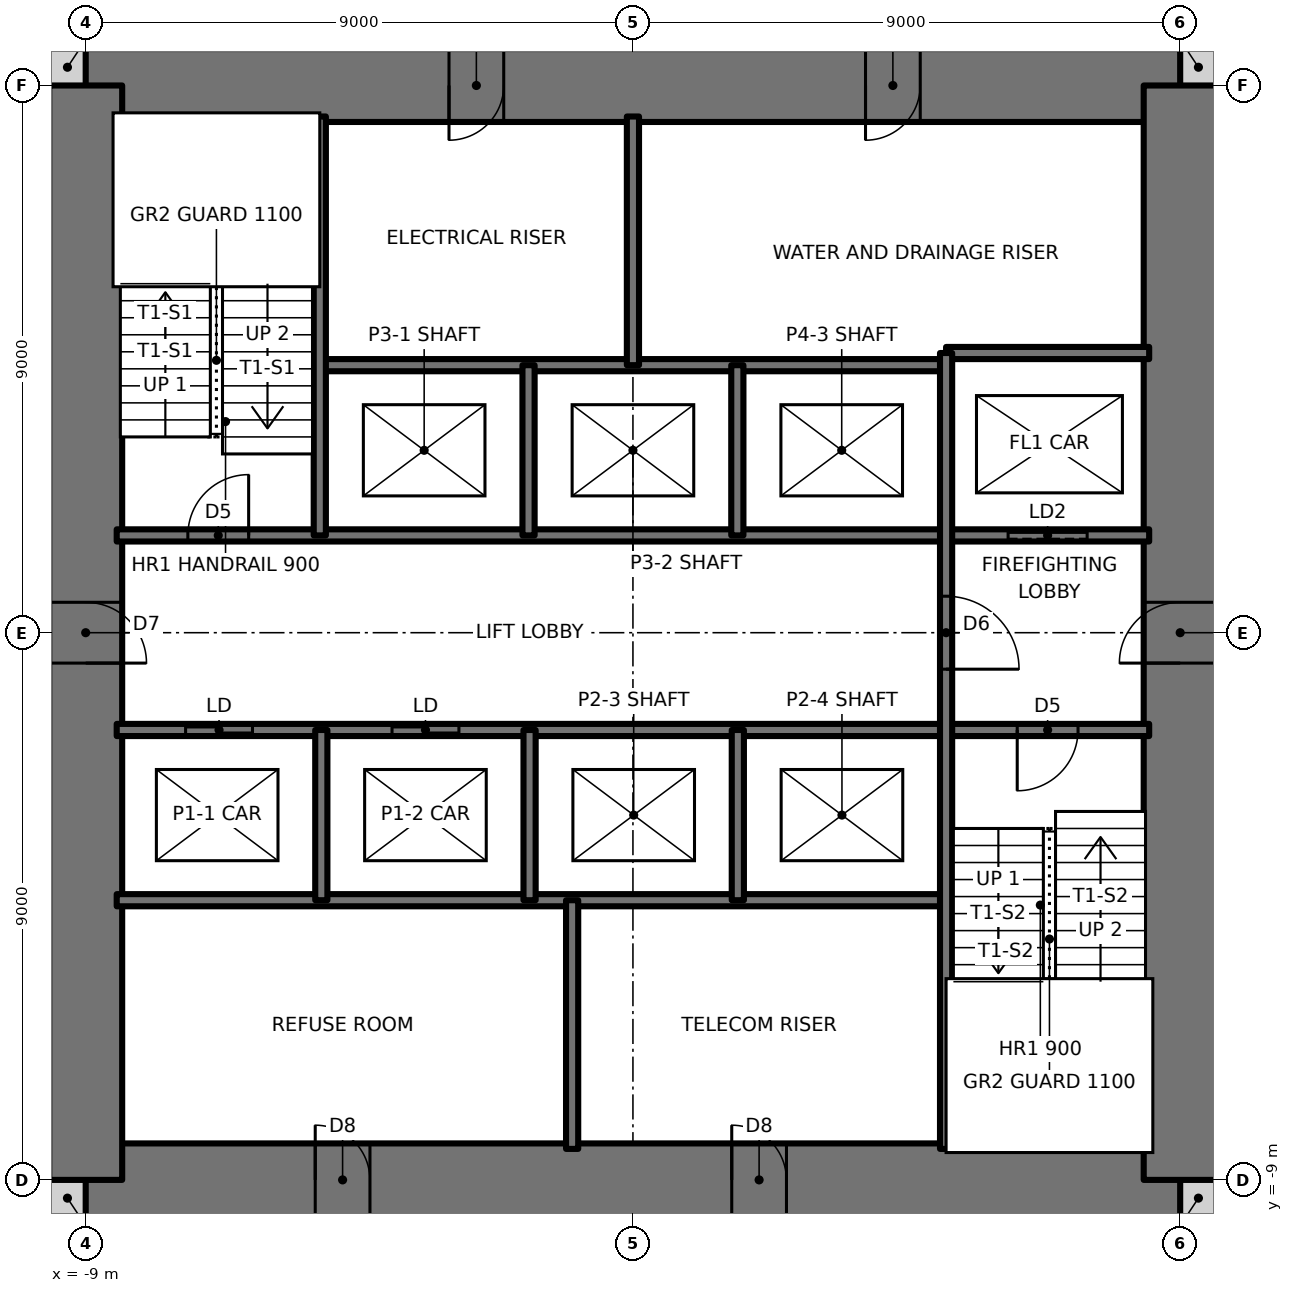
"""IFC4 building model, lengths in metres.
Left out: names, types, materials, properties, quantities, classifications, styles, units other than length and angle.
Written with IfcOpenShell. Run it as: python <this file> out.ifc"""

import sys

from ifc_helpers import new_model, si_unit, direction, frame, frame_2d, origin, place, context, subcontext, project, spatial, rectangle, extrude, element, fill, save


model = new_model("IFC4")
c1 = context("Model", 3, precision=1e-05, world=origin(), true_north=direction((0.0, 1.0)))
c2 = subcontext(c1, "Body", "Model", "MODEL_VIEW")
j1 = project(units=[si_unit("LENGTHUNIT", "METRE"), si_unit("PLANEANGLEUNIT", "RADIAN")], contexts=[c1])
p1 = place(None, origin())
s1 = spatial("IfcSite", under=j1, at=p1, CompositionType="ELEMENT")
p2 = place(p1, origin())
s2 = spatial("IfcBuilding", under=s1, at=p2, CompositionType="ELEMENT")
p3 = place(p2, frame((0.0, 0.0, 50.0)))
s3 = spatial("IfcBuildingStorey", under=s2, at=p3, CompositionType="ELEMENT", Elevation=50.0)
for number, where, z_axis, x_axis in (
    (1, (-9.6, -9.3, 0.0), (0.0, 0.0, 1.0), (1.0, 0.0, 0.0)),
    (2, (9.0, -9.3, 0.0), (0.0, 0.0, 1.0), (1.0, 0.0, 0.0)),
    (3, (9.0, 9.3, 0.0), (0.0, 0.0, 1.0), (1.0, 0.0, 0.0)),
    (4, (-9.6, 9.3, 0.0), (0.0, 0.0, 1.0), (1.0, 0.0, 0.0)),
):
    element("IfcWall", number, at=place(p3, frame(where, z_axis=z_axis, x_axis=x_axis)), inside=s3, PredefinedType="SOLIDWALL", context=c2, shape_type="SweptSolid", body=[
        extrude(rectangle(XDim=0.6, YDim=0.6, at=frame_2d((0.3, 0.0))), origin(), (0.0, 0.0, 1.0), 3.5),
    ])
p4 = place(p3, frame((-9.0, -9.0, 0.0), z_axis=(0.0, 0.0, 1.0), x_axis=(1.0, 0.0, 0.0)))
e5 = element("IfcWall", 5, at=p4, inside=s3, PredefinedType="SHEAR", context=c2, shape_type="SweptSolid", body=[
    extrude(rectangle(XDim=18.0, YDim=1.2, at=frame_2d((9.0, 0.0))), origin(), (0.0, 0.0, 1.0), 3.5),
])
p5 = place(p4, frame((3.775, 0.0, 0.0)))
e6 = element("IfcOpeningElement", 6, at=p5, cuts=e5, PredefinedType="OPENING", context=c2, shape_type="SweptSolid", body=[
    extrude(rectangle(XDim=0.9, YDim=2.1, at=frame_2d((0.45, 1.05))), frame((0.0, 0.61, 0.0), z_axis=(0.0, -1.0, 0.0), x_axis=(1.0, 0.0, 0.0)), (0.0, 0.0, 1.0), 1.22),
])
p6 = place(p4, frame((10.625, 0.0, 0.0)))
e7 = element("IfcOpeningElement", 7, at=p6, cuts=e5, PredefinedType="OPENING", context=c2, shape_type="SweptSolid", body=[
    extrude(rectangle(XDim=0.9, YDim=2.1, at=frame_2d((0.45, 1.05))), frame((0.0, 0.61, 0.0), z_axis=(0.0, -1.0, 0.0), x_axis=(1.0, 0.0, 0.0)), (0.0, 0.0, 1.0), 1.22),
])
p7 = place(p3, frame((9.0, 9.0, 0.0), z_axis=(0.0, 0.0, 1.0), x_axis=(-1.0, 0.0, 0.0)))
e8 = element("IfcWall", 8, at=p7, inside=s3, PredefinedType="SHEAR", context=c2, shape_type="SweptSolid", body=[
    extrude(rectangle(XDim=18.0, YDim=1.2, at=frame_2d((9.0, 0.0))), origin(), (0.0, 0.0, 1.0), 3.5),
])
p8 = place(p7, frame((11.125, 0.0, 0.0)))
e9 = element("IfcOpeningElement", 9, at=p8, cuts=e8, PredefinedType="OPENING", context=c2, shape_type="SweptSolid", body=[
    extrude(rectangle(XDim=0.9, YDim=2.1, at=frame_2d((0.45, 1.05))), frame((0.0, 0.61, 0.0), z_axis=(0.0, -1.0, 0.0), x_axis=(1.0, 0.0, 0.0)), (0.0, 0.0, 1.0), 1.22),
])
p9 = place(p7, frame((4.275, 0.0, 0.0)))
e10 = element("IfcOpeningElement", 10, at=p9, cuts=e8, PredefinedType="OPENING", context=c2, shape_type="SweptSolid", body=[
    extrude(rectangle(XDim=0.9, YDim=2.1, at=frame_2d((0.45, 1.05))), frame((0.0, 0.61, 0.0), z_axis=(0.0, -1.0, 0.0), x_axis=(1.0, 0.0, 0.0)), (0.0, 0.0, 1.0), 1.22),
])
p10 = place(p3, frame((9.0, -9.0, 0.0), z_axis=(0.0, 0.0, 1.0), x_axis=(0.0, 1.0, 0.0)))
e11 = element("IfcWall", 11, at=p10, inside=s3, PredefinedType="SHEAR", context=c2, shape_type="SweptSolid", body=[
    extrude(rectangle(XDim=18.0, YDim=1.2, at=frame_2d((9.0, 0.0))), origin(), (0.0, 0.0, 1.0), 3.5),
])
p11 = place(p10, frame((8.5, 0.0, 0.0)))
e12 = element("IfcOpeningElement", 12, at=p11, cuts=e11, PredefinedType="OPENING", context=c2, shape_type="SweptSolid", body=[
    extrude(rectangle(XDim=1.0, YDim=2.1, at=frame_2d((0.5, 1.05))), frame((0.0, 0.61, 0.0), z_axis=(0.0, -1.0, 0.0), x_axis=(1.0, 0.0, 0.0)), (0.0, 0.0, 1.0), 1.22),
])
p12 = place(p3, frame((-9.0, 9.0, 0.0), z_axis=(0.0, 0.0, 1.0), x_axis=(0.0, -1.0, 0.0)))
e13 = element("IfcWall", 13, at=p12, inside=s3, PredefinedType="SHEAR", context=c2, shape_type="SweptSolid", body=[
    extrude(rectangle(XDim=18.0, YDim=1.2, at=frame_2d((9.0, 0.0))), origin(), (0.0, 0.0, 1.0), 3.5),
])
p13 = place(p12, frame((8.5, 0.0, 0.0)))
e14 = element("IfcOpeningElement", 14, at=p13, cuts=e13, PredefinedType="OPENING", context=c2, shape_type="SweptSolid", body=[
    extrude(rectangle(XDim=1.0, YDim=2.1, at=frame_2d((0.5, 1.05))), frame((0.0, 0.61, 0.0), z_axis=(0.0, -1.0, 0.0), x_axis=(1.0, 0.0, 0.0)), (0.0, 0.0, 1.0), 1.22),
])
p14 = place(p3, frame((-8.49, -4.4, 0.0), z_axis=(0.0, 0.0, 1.0), x_axis=(1.0, 0.0, 0.0)))
e15 = element("IfcWall", 15, at=p14, inside=s3, PredefinedType="SOLIDWALL", context=c2, shape_type="SweptSolid", body=[
    extrude(rectangle(XDim=13.64, YDim=0.2, at=frame_2d((6.82, 0.0))), origin(), (0.0, 0.0, 1.0), 3.5),
])
p15 = place(p3, frame((-8.49, -1.6, 0.0), z_axis=(0.0, 0.0, 1.0), x_axis=(1.0, 0.0, 0.0)))
e16 = element("IfcWall", 16, at=p15, inside=s3, PredefinedType="SOLIDWALL", context=c2, shape_type="SweptSolid", body=[
    extrude(rectangle(XDim=16.98, YDim=0.2, at=frame_2d((8.49, 0.0))), origin(), (0.0, 0.0, 1.0), 3.5),
])
p16 = place(p15, frame((14.81, 0.0, 0.0)))
e17 = element("IfcOpeningElement", 17, at=p16, cuts=e16, PredefinedType="OPENING", context=c2, shape_type="SweptSolid", body=[
    extrude(rectangle(XDim=1.0, YDim=2.1, at=frame_2d((0.5, 1.05))), frame((0.0, 0.11, 0.0), z_axis=(0.0, -1.0, 0.0), x_axis=(1.0, 0.0, 0.0)), (0.0, 0.0, 1.0), 0.22),
])
p17 = place(p15, frame((1.133, 0.0, 0.0)))
e18 = element("IfcOpeningElement", 18, at=p17, cuts=e16, PredefinedType="OPENING", context=c2, shape_type="SweptSolid", body=[
    extrude(rectangle(XDim=1.1, YDim=2.1, at=frame_2d((0.55, 1.05))), frame((0.0, 0.11, 0.0), z_axis=(0.0, -1.0, 0.0), x_axis=(1.0, 0.0, 0.0)), (0.0, 0.0, 1.0), 0.22),
])
p18 = place(p15, frame((4.528, 0.0, 0.0)))
e19 = element("IfcOpeningElement", 19, at=p18, cuts=e16, PredefinedType="OPENING", context=c2, shape_type="SweptSolid", body=[
    extrude(rectangle(XDim=1.1, YDim=2.1, at=frame_2d((0.55, 1.05))), frame((0.0, 0.11, 0.0), z_axis=(0.0, -1.0, 0.0), x_axis=(1.0, 0.0, 0.0)), (0.0, 0.0, 1.0), 0.22),
])
p19 = place(p3, frame((-8.49, 1.6, 0.0), z_axis=(0.0, 0.0, 1.0), x_axis=(1.0, 0.0, 0.0)))
e20 = element("IfcWall", 20, at=p19, inside=s3, PredefinedType="SOLIDWALL", context=c2, shape_type="SweptSolid", body=[
    extrude(rectangle(XDim=16.98, YDim=0.2, at=frame_2d((8.49, 0.0))), origin(), (0.0, 0.0, 1.0), 3.5),
])
p20 = place(p19, frame((1.17, 0.0, 0.0)))
e21 = element("IfcOpeningElement", 21, at=p20, cuts=e20, PredefinedType="OPENING", context=c2, shape_type="SweptSolid", body=[
    extrude(rectangle(XDim=1.0, YDim=2.1, at=frame_2d((0.5, 1.05))), frame((0.0, 0.11, 0.0), z_axis=(0.0, -1.0, 0.0), x_axis=(1.0, 0.0, 0.0)), (0.0, 0.0, 1.0), 0.22),
])
p21 = place(p19, frame((14.66, 0.0, 0.0)))
e22 = element("IfcOpeningElement", 22, at=p21, cuts=e20, PredefinedType="OPENING", context=c2, shape_type="SweptSolid", body=[
    extrude(rectangle(XDim=1.3, YDim=2.1, at=frame_2d((0.65, 1.05))), frame((0.0, 0.11, 0.0), z_axis=(0.0, -1.0, 0.0), x_axis=(1.0, 0.0, 0.0)), (0.0, 0.0, 1.0), 0.22),
])
p22 = place(p3, frame((-5.15, 4.4, 0.0), z_axis=(0.0, 0.0, 1.0), x_axis=(1.0, 0.0, 0.0)))
e23 = element("IfcWall", 23, at=p22, inside=s3, PredefinedType="SOLIDWALL", context=c2, shape_type="SweptSolid", body=[
    extrude(rectangle(XDim=10.3, YDim=0.2, at=frame_2d((5.15, 0.0))), origin(), (0.0, 0.0, 1.0), 3.5),
])
p23 = place(p3, frame((5.15, 4.6, 0.0), z_axis=(0.0, 0.0, 1.0), x_axis=(1.0, 0.0, 0.0)))
e24 = element("IfcWall", 24, at=p23, inside=s3, PredefinedType="SOLIDWALL", context=c2, shape_type="SweptSolid", body=[
    extrude(rectangle(XDim=3.34, YDim=0.2, at=frame_2d((1.67, 0.0))), origin(), (0.0, 0.0, 1.0), 3.5),
])
p24 = place(p3, frame((5.15, -8.49, 0.0), z_axis=(0.0, 0.0, 1.0), x_axis=(0.0, 1.0, 0.0)))
e25 = element("IfcWall", 25, at=p24, inside=s3, PredefinedType="SOLIDWALL", context=c2, shape_type="SweptSolid", body=[
    extrude(rectangle(XDim=13.09, YDim=0.2, at=frame_2d((6.545, 0.0))), origin(), (0.0, 0.0, 1.0), 3.5),
])
p25 = place(p24, frame((7.89, 0.0, 0.0)))
e26 = element("IfcOpeningElement", 26, at=p25, cuts=e25, PredefinedType="OPENING", context=c2, shape_type="SweptSolid", body=[
    extrude(rectangle(XDim=1.2, YDim=2.1, at=frame_2d((0.6, 1.05))), frame((0.0, 0.11, 0.0), z_axis=(0.0, -1.0, 0.0), x_axis=(1.0, 0.0, 0.0)), (0.0, 0.0, 1.0), 0.22),
])
for number, where, z_axis, x_axis in (
    (27, (1.725, -4.4, 0.0), (0.0, 0.0, 1.0), (0.0, 1.0, 0.0)),
    (28, (1.717, 1.6, 0.0), (0.0, 0.0, 1.0), (0.0, 1.0, 0.0)),
):
    element("IfcWall", number, at=place(p3, frame(where, z_axis=z_axis, x_axis=x_axis)), inside=s3, PredefinedType="SOLIDWALL", context=c2, shape_type="SweptSolid", body=[
        extrude(rectangle(XDim=2.8, YDim=0.2, at=frame_2d((1.4, 0.0))), origin(), (0.0, 0.0, 1.0), 3.5),
    ])
for number, where, z_axis, x_axis in (
    (29, (0.0, 4.4, 0.0), (0.0, 0.0, 1.0), (0.0, 1.0, 0.0)),
    (30, (-1.0, -8.49, 0.0), (0.0, 0.0, 1.0), (0.0, 1.0, 0.0)),
):
    element("IfcWall", number, at=place(p3, frame(where, z_axis=z_axis, x_axis=x_axis)), inside=s3, PredefinedType="SOLIDWALL", context=c2, shape_type="SweptSolid", body=[
        extrude(rectangle(XDim=4.09, YDim=0.2, at=frame_2d((2.045, 0.0))), origin(), (0.0, 0.0, 1.0), 3.5),
    ])
for number, where, z_axis, x_axis in (
    (31, (-1.7, -4.4, 0.0), (0.0, 0.0, 1.0), (0.0, 1.0, 0.0)),
    (32, (-1.717, 1.6, 0.0), (0.0, 0.0, 1.0), (0.0, 1.0, 0.0)),
    (33, (-5.125, -4.4, 0.0), (0.0, 0.0, 1.0), (0.0, 1.0, 0.0)),
):
    element("IfcWall", number, at=place(p3, frame(where, z_axis=z_axis, x_axis=x_axis)), inside=s3, PredefinedType="SOLIDWALL", context=c2, shape_type="SweptSolid", body=[
        extrude(rectangle(XDim=2.8, YDim=0.2, at=frame_2d((1.4, 0.0))), origin(), (0.0, 0.0, 1.0), 3.5),
    ])
p26 = place(p3, frame((-5.15, 1.6, 0.0), z_axis=(0.0, 0.0, 1.0), x_axis=(0.0, 1.0, 0.0)))
e34 = element("IfcWall", 34, at=p26, inside=s3, PredefinedType="SOLIDWALL", context=c2, shape_type="SweptSolid", body=[
    extrude(rectangle(XDim=6.89, YDim=0.2, at=frame_2d((3.445, 0.0))), origin(), (0.0, 0.0, 1.0), 3.5),
])
p27 = place(p20, origin())
e35 = element("IfcDoor", 35, at=p27, inside=s3, OperationType="SINGLE_SWING_RIGHT", PredefinedType="DOOR", context=c2, shape_type="SweptSolid", body=[
    extrude(rectangle(XDim=1.0, YDim=2.1, at=frame_2d((0.5, 1.05))), frame((0.0, 0.025, 0.0), z_axis=(0.0, -1.0, 0.0), x_axis=(1.0, 0.0, 0.0)), (0.0, 0.0, 1.0), 0.05),
])
fill(e21, e35)
p28 = place(p16, frame((1.0, 0.0, 0.0), z_axis=(0.0, 0.0, 1.0), x_axis=(-1.0, 0.0, 0.0)))
e36 = element("IfcDoor", 36, at=p28, inside=s3, OperationType="SINGLE_SWING_RIGHT", PredefinedType="DOOR", context=c2, shape_type="SweptSolid", body=[
    extrude(rectangle(XDim=1.0, YDim=2.1, at=frame_2d((0.5, 1.05))), frame((0.0, 0.025, 0.0), z_axis=(0.0, -1.0, 0.0), x_axis=(1.0, 0.0, 0.0)), (0.0, 0.0, 1.0), 0.05),
])
fill(e17, e36)
p29 = place(p25, frame((1.2, 0.0, 0.0), z_axis=(0.0, 0.0, 1.0), x_axis=(-1.0, 0.0, 0.0)))
e37 = element("IfcDoor", 37, at=p29, inside=s3, OperationType="SINGLE_SWING_RIGHT", PredefinedType="DOOR", context=c2, shape_type="SweptSolid", body=[
    extrude(rectangle(XDim=1.2, YDim=2.1, at=frame_2d((0.6, 1.05))), frame((0.0, 0.025, 0.0), z_axis=(0.0, -1.0, 0.0), x_axis=(1.0, 0.0, 0.0)), (0.0, 0.0, 1.0), 0.05),
])
fill(e26, e37)
p30 = place(p13, origin())
e38 = element("IfcDoor", 38, at=p30, inside=s3, OperationType="SINGLE_SWING_RIGHT", PredefinedType="DOOR", context=c2, shape_type="SweptSolid", body=[
    extrude(rectangle(XDim=1.0, YDim=2.1, at=frame_2d((0.5, 1.05))), frame((0.0, 0.025, 0.0), z_axis=(0.0, -1.0, 0.0), x_axis=(1.0, 0.0, 0.0)), (0.0, 0.0, 1.0), 0.05),
])
fill(e14, e38)
p31 = place(p11, origin())
e39 = element("IfcDoor", 39, at=p31, inside=s3, OperationType="SINGLE_SWING_LEFT", PredefinedType="DOOR", context=c2, shape_type="SweptSolid", body=[
    extrude(rectangle(XDim=1.0, YDim=2.1, at=frame_2d((0.5, 1.05))), frame((0.0, 0.025, 0.0), z_axis=(0.0, -1.0, 0.0), x_axis=(1.0, 0.0, 0.0)), (0.0, 0.0, 1.0), 0.05),
])
fill(e12, e39)
p32 = place(p8, origin())
e40 = element("IfcDoor", 40, at=p32, inside=s3, OperationType="SINGLE_SWING_RIGHT", PredefinedType="DOOR", context=c2, shape_type="SweptSolid", body=[
    extrude(rectangle(XDim=0.9, YDim=2.1, at=frame_2d((0.45, 1.05))), frame((0.0, 0.025, 0.0), z_axis=(0.0, -1.0, 0.0), x_axis=(1.0, 0.0, 0.0)), (0.0, 0.0, 1.0), 0.05),
])
fill(e9, e40)
p33 = place(p9, origin())
e41 = element("IfcDoor", 41, at=p33, inside=s3, OperationType="SINGLE_SWING_RIGHT", PredefinedType="DOOR", context=c2, shape_type="SweptSolid", body=[
    extrude(rectangle(XDim=0.9, YDim=2.1, at=frame_2d((0.45, 1.05))), frame((0.0, 0.025, 0.0), z_axis=(0.0, -1.0, 0.0), x_axis=(1.0, 0.0, 0.0)), (0.0, 0.0, 1.0), 0.05),
])
fill(e10, e41)
p34 = place(p5, origin())
e42 = element("IfcDoor", 42, at=p34, inside=s3, OperationType="SINGLE_SWING_LEFT", PredefinedType="DOOR", context=c2, shape_type="SweptSolid", body=[
    extrude(rectangle(XDim=0.9, YDim=2.1, at=frame_2d((0.45, 1.05))), frame((0.0, 0.025, 0.0), z_axis=(0.0, -1.0, 0.0), x_axis=(1.0, 0.0, 0.0)), (0.0, 0.0, 1.0), 0.05),
])
fill(e6, e42)
p35 = place(p6, origin())
e43 = element("IfcDoor", 43, at=p35, inside=s3, OperationType="SINGLE_SWING_LEFT", PredefinedType="DOOR", context=c2, shape_type="SweptSolid", body=[
    extrude(rectangle(XDim=0.9, YDim=2.1, at=frame_2d((0.45, 1.05))), frame((0.0, 0.025, 0.0), z_axis=(0.0, -1.0, 0.0), x_axis=(1.0, 0.0, 0.0)), (0.0, 0.0, 1.0), 0.05),
])
fill(e7, e43)
p36 = place(p17, origin())
e44 = element("IfcDoor", 44, at=p36, inside=s3, OperationType="DOUBLE_DOOR_SLIDING", PredefinedType="DOOR", context=c2, shape_type="SweptSolid", body=[
    extrude(rectangle(XDim=1.1, YDim=2.1, at=frame_2d((0.55, 1.05))), frame((0.0, 0.025, 0.0), z_axis=(0.0, -1.0, 0.0), x_axis=(1.0, 0.0, 0.0)), (0.0, 0.0, 1.0), 0.05),
])
fill(e18, e44)
p37 = place(p18, origin())
e45 = element("IfcDoor", 45, at=p37, inside=s3, OperationType="DOUBLE_DOOR_SLIDING", PredefinedType="DOOR", context=c2, shape_type="SweptSolid", body=[
    extrude(rectangle(XDim=1.1, YDim=2.1, at=frame_2d((0.55, 1.05))), frame((0.0, 0.025, 0.0), z_axis=(0.0, -1.0, 0.0), x_axis=(1.0, 0.0, 0.0)), (0.0, 0.0, 1.0), 0.05),
])
fill(e19, e45)
p38 = place(p21, origin())
e46 = element("IfcDoor", 46, at=p38, inside=s3, OperationType="SLIDING_TO_LEFT", PredefinedType="DOOR", context=c2, shape_type="SweptSolid", body=[
    extrude(rectangle(XDim=1.3, YDim=2.1, at=frame_2d((0.65, 1.05))), frame((0.0, 0.025, 0.0), z_axis=(0.0, -1.0, 0.0), x_axis=(1.0, 0.0, 0.0)), (0.0, 0.0, 1.0), 0.05),
])
fill(e22, e46)
save(model, sys.argv[1])
